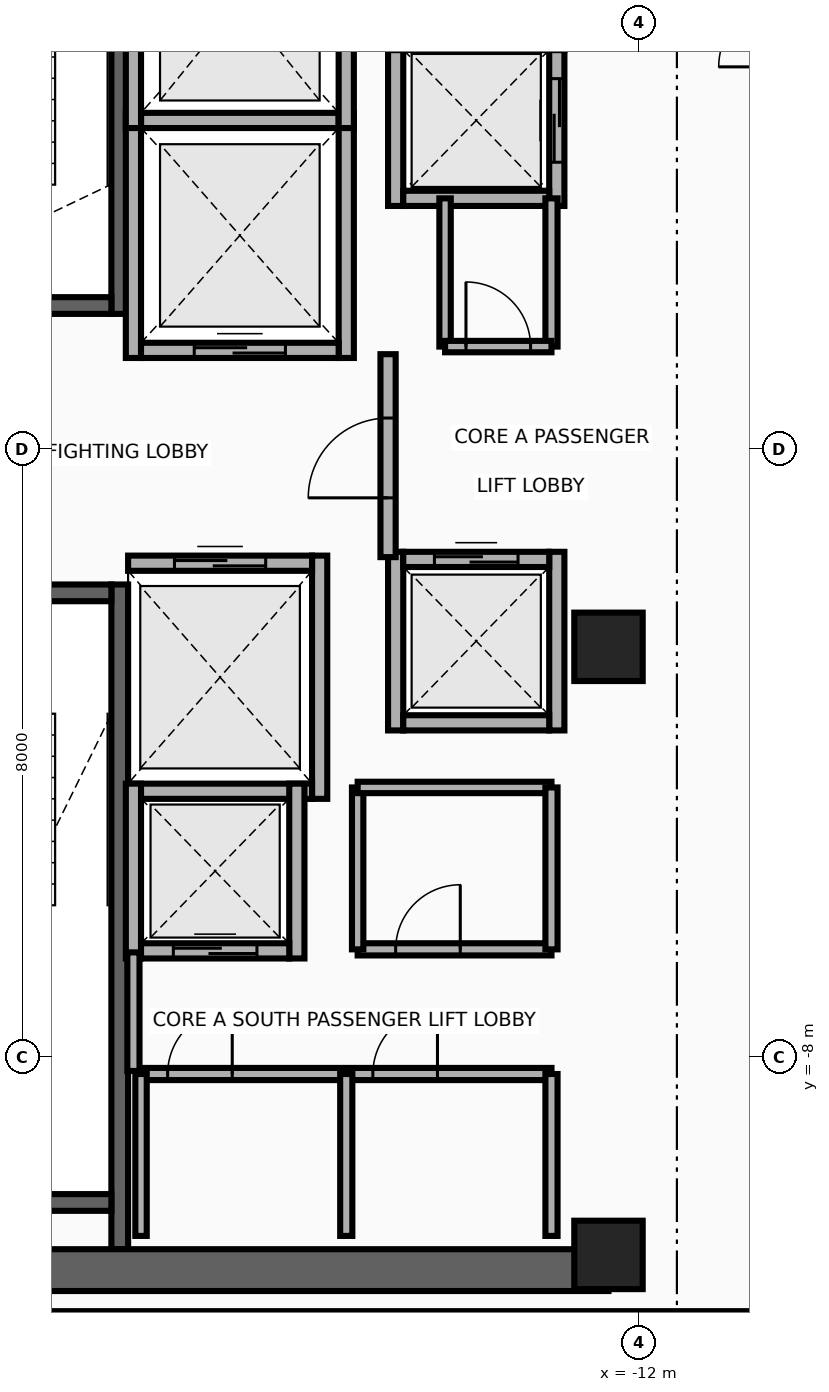
"""IFC4 building model, lengths in metres.
Left out: names, types, materials, properties, quantities, classifications, styles, units other than length and angle.
Written with IfcOpenShell. Run it as: python <this file> out.ifc"""

import sys

from ifc_helpers import new_model, si_unit, direction, frame, frame_2d, origin, origin_2d, place, context, subcontext, project, spatial, rectangle, extrude, source, transform, mapped, element, fill, save


model = new_model("IFC4")
c1 = context("Model", 3, precision=1e-05, world=origin(), true_north=direction((0.0, 1.0)))
c2 = subcontext(c1, "Body", "Model", "MODEL_VIEW")
j1 = project(units=[si_unit("LENGTHUNIT", "METRE"), si_unit("PLANEANGLEUNIT", "RADIAN")], contexts=[c1])
p1 = place(None, origin())
s1 = spatial("IfcSite", under=j1, at=p1, CompositionType="ELEMENT")
p2 = place(p1, origin())
s2 = spatial("IfcBuilding", under=s1, at=p2, CompositionType="ELEMENT")
p3 = place(p2, frame((0.0, 0.0, 223.0)))
s3 = spatial("IfcBuildingStorey", under=s2, at=p3, CompositionType="ELEMENT", Elevation=223.0)
p4 = place(p3, frame((-18.83, 1.78, 0.0), z_axis=(0.0, 0.0, 1.0), x_axis=(0.0, 1.0, 0.0)))
e1 = element("IfcWall", 1, at=p4, inside=s3, PredefinedType="SHEAR", context=c2, shape_type="SweptSolid", body=[
    extrude(rectangle(XDim=8.745, YDim=0.22, at=frame_2d((4.373, 0.0))), origin(), (0.0, 0.0, 1.0), 3.26),
])
p5 = place(p3, frame((-22.05, 1.89, 0.0), z_axis=(0.0, 0.0, 1.0), x_axis=(1.0, 0.0, 0.0)))
e2 = element("IfcWall", 2, at=p5, inside=s3, PredefinedType="SHEAR", context=c2, shape_type="SweptSolid", body=[
    extrude(rectangle(XDim=3.11, YDim=0.22, at=frame_2d((1.555, 0.0))), origin(), (0.0, 0.0, 1.0), 3.26),
])
p6 = place(p5, frame((1.0, 0.0, 0.0)))
e3 = element("IfcOpeningElement", 3, at=p6, cuts=e2, PredefinedType="OPENING", context=c2, shape_type="SweptSolid", body=[
    extrude(rectangle(XDim=1.1, YDim=2.15, at=frame_2d((0.55, 1.075))), frame((0.0, 0.125, 0.0), z_axis=(0.0, -1.0, 0.0), x_axis=(1.0, 0.0, 0.0)), (0.0, 0.0, 1.0), 0.25),
])
p7 = place(p3, frame((-18.83, -10.525, 0.0), z_axis=(0.0, 0.0, 1.0), x_axis=(0.0, 1.0, 0.0)))
e4 = element("IfcWall", 4, at=p7, inside=s3, PredefinedType="SHEAR", context=c2, shape_type="SweptSolid", body=[
    extrude(rectangle(XDim=8.745, YDim=0.22, at=frame_2d((4.373, 0.0))), origin(), (0.0, 0.0, 1.0), 3.26),
])
p8 = place(p3, frame((-22.05, -9.91, 0.0), z_axis=(0.0, 0.0, 1.0), x_axis=(1.0, 0.0, 0.0)))
e5 = element("IfcWall", 5, at=p8, inside=s3, PredefinedType="SHEAR", context=c2, shape_type="SweptSolid", body=[
    extrude(rectangle(XDim=3.11, YDim=0.22, at=frame_2d((1.555, 0.0))), origin(), (0.0, 0.0, 1.0), 3.26),
])
p9 = place(p3, frame((-22.05, -1.89, 0.0), z_axis=(0.0, 0.0, 1.0), x_axis=(1.0, 0.0, 0.0)))
e6 = element("IfcWall", 6, at=p9, inside=s3, PredefinedType="SHEAR", context=c2, shape_type="SweptSolid", body=[
    extrude(rectangle(XDim=3.11, YDim=0.22, at=frame_2d((1.555, 0.0))), origin(), (0.0, 0.0, 1.0), 3.26),
])
p10 = place(p9, frame((1.0, 0.0, 0.0)))
e7 = element("IfcOpeningElement", 7, at=p10, cuts=e6, PredefinedType="OPENING", context=c2, shape_type="SweptSolid", body=[
    extrude(rectangle(XDim=1.1, YDim=2.15, at=frame_2d((0.55, 1.075))), frame((0.0, 0.125, 0.0), z_axis=(0.0, -1.0, 0.0), x_axis=(1.0, 0.0, 0.0)), (0.0, 0.0, 1.0), 0.25),
])
p11 = place(p3, frame((-22.65, -10.8, 0.0), z_axis=(0.0, 0.0, 1.0), x_axis=(1.0, 0.0, 0.0)))
e8 = element("IfcWall", 8, at=p11, inside=s3, PredefinedType="SHEAR", context=c2, shape_type="SweptSolid", body=[
    extrude(rectangle(XDim=10.25, YDim=0.55, at=frame_2d((5.125, 0.0))), origin(), (0.0, 0.0, 1.0), 3.26),
])
m1 = source(origin(), c2, "Body", "SweptSolid", [
    extrude(rectangle(XDim=0.9, YDim=0.9, at=origin_2d()), origin(), (0.0, 0.0, 1.0), 3.5),
])
for number, where, z_axis, x_axis in (
    (9, (-12.4, -10.6, 0.0), (0.0, 0.0, 1.0), (1.0, 0.0, 0.0)),
    (10, (-12.4, -2.6, 0.0), (0.0, 0.0, 1.0), (1.0, 0.0, 0.0)),
):
    element("IfcColumn", number, at=place(p3, frame(where, z_axis=z_axis, x_axis=x_axis)), inside=s3, PredefinedType="COLUMN", context=c2, shape_type="MappedRepresentation", body=[
        mapped(m1, transform((0.0, 0.0, 0.0), x_axis=(1.0, 0.0, 0.0), y_axis=(0.0, 1.0, 0.0), z_axis=(0.0, 0.0, 1.0), scale=1.0)),
    ])
for number, where, z_axis, x_axis in (
    (11, (-18.65, 1.2, 0.0), (0.0, 0.0, 1.0), (0.0, 1.0, 0.0)),
    (12, (-15.85, 1.2, 0.0), (0.0, 0.0, 1.0), (0.0, 1.0, 0.0)),
):
    element("IfcWall", number, at=place(p3, frame(where, z_axis=z_axis, x_axis=x_axis)), inside=s3, PredefinedType="MOVABLE", context=c2, shape_type="SweptSolid", body=[
        extrude(rectangle(XDim=3.225, YDim=0.2, at=frame_2d((1.613, 0.0))), origin(), (0.0, 0.0, 1.0), 3.26),
    ])
p12 = place(p3, frame((-18.55, 1.3, 0.0), z_axis=(0.0, 0.0, 1.0), x_axis=(1.0, 0.0, 0.0)))
e13 = element("IfcWall", 13, at=p12, inside=s3, PredefinedType="MOVABLE", context=c2, shape_type="SweptSolid", body=[
    extrude(rectangle(XDim=2.6, YDim=0.2, at=frame_2d((1.3, 0.0))), origin(), (0.0, 0.0, 1.0), 3.26),
])
p13 = place(p12, frame((0.7, 0.0, 0.0)))
e14 = element("IfcOpeningElement", 14, at=p13, cuts=e13, PredefinedType="OPENING", context=c2, shape_type="SweptSolid", body=[
    extrude(rectangle(XDim=1.2, YDim=2.1, at=frame_2d((0.6, 1.05))), frame((0.0, 0.115, 0.0), z_axis=(0.0, -1.0, 0.0), x_axis=(1.0, 0.0, 0.0)), (0.0, 0.0, 1.0), 0.23),
])
p14 = place(p3, frame((-18.55, 4.325, 0.0), z_axis=(0.0, 0.0, 1.0), x_axis=(1.0, 0.0, 0.0)))
e15 = element("IfcWall", 15, at=p14, inside=s3, PredefinedType="MOVABLE", context=c2, shape_type="SweptSolid", body=[
    extrude(rectangle(XDim=2.6, YDim=0.2, at=frame_2d((1.3, 0.0))), origin(), (0.0, 0.0, 1.0), 3.26),
])
p15 = place(p3, frame((-16.2, -4.6, 0.0), z_axis=(0.0, 0.0, 1.0), x_axis=(0.0, 1.0, 0.0)))
e16 = element("IfcWall", 16, at=p15, inside=s3, PredefinedType="MOVABLE", context=c2, shape_type="SweptSolid", body=[
    extrude(rectangle(XDim=3.2, YDim=0.2, at=frame_2d((1.6, 0.0))), origin(), (0.0, 0.0, 1.0), 3.26),
])
p16 = place(p3, frame((-18.72, -4.5, 0.0), z_axis=(0.0, 0.0, 1.0), x_axis=(1.0, 0.0, 0.0)))
e17 = element("IfcWall", 17, at=p16, inside=s3, PredefinedType="MOVABLE", context=c2, shape_type="SweptSolid", body=[
    extrude(rectangle(XDim=2.42, YDim=0.2, at=frame_2d((1.21, 0.0))), origin(), (0.0, 0.0, 1.0), 3.26),
])
p17 = place(p3, frame((-18.72, -1.5, 0.0), z_axis=(0.0, 0.0, 1.0), x_axis=(1.0, 0.0, 0.0)))
e18 = element("IfcWall", 18, at=p17, inside=s3, PredefinedType="MOVABLE", context=c2, shape_type="SweptSolid", body=[
    extrude(rectangle(XDim=2.42, YDim=0.2, at=frame_2d((1.21, 0.0))), origin(), (0.0, 0.0, 1.0), 3.26),
])
p18 = place(p17, frame((0.61, 0.0, 0.0)))
e19 = element("IfcOpeningElement", 19, at=p18, cuts=e18, PredefinedType="OPENING", context=c2, shape_type="SweptSolid", body=[
    extrude(rectangle(XDim=1.2, YDim=2.1, at=frame_2d((0.6, 1.05))), frame((0.0, 0.115, 0.0), z_axis=(0.0, -1.0, 0.0), x_axis=(1.0, 0.0, 0.0)), (0.0, 0.0, 1.0), 0.23),
])
for number, where, z_axis, x_axis in (
    (20, (-18.65, 4.225, 0.0), (0.0, 0.0, 1.0), (0.0, 1.0, 0.0)),
    (21, (-15.85, 4.225, 0.0), (0.0, 0.0, 1.0), (0.0, 1.0, 0.0)),
):
    element("IfcWall", number, at=place(p3, frame(where, z_axis=z_axis, x_axis=x_axis)), inside=s3, PredefinedType="MOVABLE", context=c2, shape_type="SweptSolid", body=[
        extrude(rectangle(XDim=3.325, YDim=0.2, at=frame_2d((1.663, 0.0))), origin(), (0.0, 0.0, 1.0), 3.26),
    ])
p19 = place(p3, frame((-15.2, 3.2, 0.0), z_axis=(0.0, 0.0, 1.0), x_axis=(0.0, 1.0, 0.0)))
e22 = element("IfcWall", 22, at=p19, inside=s3, PredefinedType="MOVABLE", context=c2, shape_type="SweptSolid", body=[
    extrude(rectangle(XDim=2.25, YDim=0.2, at=frame_2d((1.125, 0.0))), origin(), (0.0, 0.0, 1.0), 3.26),
])
p20 = place(p3, frame((-13.08, 3.2, 0.0), z_axis=(0.0, 0.0, 1.0), x_axis=(0.0, 1.0, 0.0)))
e23 = element("IfcWall", 23, at=p20, inside=s3, PredefinedType="MOVABLE", context=c2, shape_type="SweptSolid", body=[
    extrude(rectangle(XDim=2.25, YDim=0.2, at=frame_2d((1.125, 0.0))), origin(), (0.0, 0.0, 1.0), 3.26),
])
p21 = place(p20, frame((0.575, 0.0, 0.0)))
e24 = element("IfcOpeningElement", 24, at=p21, cuts=e23, PredefinedType="OPENING", context=c2, shape_type="SweptSolid", body=[
    extrude(rectangle(XDim=1.1, YDim=2.1, at=frame_2d((0.55, 1.05))), frame((0.0, 0.115, 0.0), z_axis=(0.0, -1.0, 0.0), x_axis=(1.0, 0.0, 0.0)), (0.0, 0.0, 1.0), 0.23),
])
p22 = place(p3, frame((-15.1, 3.3, 0.0), z_axis=(0.0, 0.0, 1.0), x_axis=(1.0, 0.0, 0.0)))
e25 = element("IfcWall", 25, at=p22, inside=s3, PredefinedType="MOVABLE", context=c2, shape_type="SweptSolid", body=[
    extrude(rectangle(XDim=1.92, YDim=0.2, at=frame_2d((0.96, 0.0))), origin(), (0.0, 0.0, 1.0), 3.26),
])
for number, where, z_axis, x_axis in (
    (26, (-18.65, -6.7, 0.0), (0.0, 0.0, 1.0), (0.0, 1.0, 0.0)),
    (27, (-16.5, -6.7, 0.0), (0.0, 0.0, 1.0), (0.0, 1.0, 0.0)),
):
    element("IfcWall", number, at=place(p3, frame(where, z_axis=z_axis, x_axis=x_axis)), inside=s3, PredefinedType="MOVABLE", context=c2, shape_type="SweptSolid", body=[
        extrude(rectangle(XDim=2.3, YDim=0.2, at=frame_2d((1.15, 0.0))), origin(), (0.0, 0.0, 1.0), 3.26),
    ])
p23 = place(p3, frame((-18.55, -6.6, 0.0), z_axis=(0.0, 0.0, 1.0), x_axis=(1.0, 0.0, 0.0)))
e28 = element("IfcWall", 28, at=p23, inside=s3, PredefinedType="MOVABLE", context=c2, shape_type="SweptSolid", body=[
    extrude(rectangle(XDim=1.95, YDim=0.2, at=frame_2d((0.975, 0.0))), origin(), (0.0, 0.0, 1.0), 3.26),
])
p24 = place(p23, frame((0.425, 0.0, 0.0)))
e29 = element("IfcOpeningElement", 29, at=p24, cuts=e28, PredefinedType="OPENING", context=c2, shape_type="SweptSolid", body=[
    extrude(rectangle(XDim=1.1, YDim=2.1, at=frame_2d((0.55, 1.05))), frame((0.0, 0.115, 0.0), z_axis=(0.0, -1.0, 0.0), x_axis=(1.0, 0.0, 0.0)), (0.0, 0.0, 1.0), 0.23),
])
for number, where, z_axis, x_axis in (
    (30, (-15.2, -3.7, 0.0), (0.0, 0.0, 1.0), (0.0, 1.0, 0.0)),
    (31, (-13.08, -3.7, 0.0), (0.0, 0.0, 1.0), (0.0, 1.0, 0.0)),
):
    element("IfcWall", number, at=place(p3, frame(where, z_axis=z_axis, x_axis=x_axis)), inside=s3, PredefinedType="MOVABLE", context=c2, shape_type="SweptSolid", body=[
        extrude(rectangle(XDim=2.35, YDim=0.2, at=frame_2d((1.175, 0.0))), origin(), (0.0, 0.0, 1.0), 3.26),
    ])
p25 = place(p3, frame((-15.1, -3.6, 0.0), z_axis=(0.0, 0.0, 1.0), x_axis=(1.0, 0.0, 0.0)))
e32 = element("IfcWall", 32, at=p25, inside=s3, PredefinedType="MOVABLE", context=c2, shape_type="SweptSolid", body=[
    extrude(rectangle(XDim=1.92, YDim=0.2, at=frame_2d((0.96, 0.0))), origin(), (0.0, 0.0, 1.0), 3.26),
])
p26 = place(p3, frame((-15.1, -1.45, 0.0), z_axis=(0.0, 0.0, 1.0), x_axis=(1.0, 0.0, 0.0)))
e33 = element("IfcWall", 33, at=p26, inside=s3, PredefinedType="MOVABLE", context=c2, shape_type="SweptSolid", body=[
    extrude(rectangle(XDim=1.92, YDim=0.2, at=frame_2d((0.96, 0.0))), origin(), (0.0, 0.0, 1.0), 3.26),
])
p27 = place(p26, frame((0.41, 0.0, 0.0)))
e34 = element("IfcOpeningElement", 34, at=p27, cuts=e33, PredefinedType="OPENING", context=c2, shape_type="SweptSolid", body=[
    extrude(rectangle(XDim=1.1, YDim=2.1, at=frame_2d((0.55, 1.05))), frame((0.0, 0.115, 0.0), z_axis=(0.0, -1.0, 0.0), x_axis=(1.0, 0.0, 0.0)), (0.0, 0.0, 1.0), 0.23),
])
p28 = place(p3, frame((-15.3, -1.42, 0.0), z_axis=(0.0, 0.0, 1.0), x_axis=(0.0, 1.0, 0.0)))
e35 = element("IfcWall", 35, at=p28, inside=s3, PredefinedType="PARTITIONING", context=c2, shape_type="SweptSolid", body=[
    extrude(rectangle(XDim=2.67, YDim=0.2, at=frame_2d((1.335, 0.0))), origin(), (0.0, 0.0, 1.0), 3.26),
])
p29 = place(p28, frame((0.78, 0.0, 0.0)))
e36 = element("IfcOpeningElement", 36, at=p29, cuts=e35, PredefinedType="OPENING", context=c2, shape_type="SweptSolid", body=[
    extrude(rectangle(XDim=1.05, YDim=2.15, at=frame_2d((0.525, 1.075))), frame((0.0, 0.115, 0.0), z_axis=(0.0, -1.0, 0.0), x_axis=(1.0, 0.0, 0.0)), (0.0, 0.0, 1.0), 0.23),
])
p30 = place(p3, frame((-18.65, -8.18, 0.0), z_axis=(0.0, 0.0, 1.0), x_axis=(0.0, 1.0, 0.0)))
e37 = element("IfcWall", 37, at=p30, inside=s3, PredefinedType="PARTITIONING", context=c2, shape_type="SweptSolid", body=[
    extrude(rectangle(XDim=1.56, YDim=0.16, at=frame_2d((0.78, 0.0))), origin(), (0.0, 0.0, 1.0), 3.26),
])
p31 = place(p3, frame((-18.55, -8.22, 0.0), z_axis=(0.0, 0.0, 1.0), x_axis=(1.0, 0.0, 0.0)))
e38 = element("IfcWall", 38, at=p31, inside=s3, PredefinedType="PARTITIONING", context=c2, shape_type="SweptSolid", body=[
    extrude(rectangle(XDim=5.4, YDim=0.16, at=frame_2d((2.7, 0.0))), origin(), (0.0, 0.0, 1.0), 3.26),
])
p32 = place(p31, frame((0.35, 0.0, 0.0)))
e39 = element("IfcOpeningElement", 39, at=p32, cuts=e38, PredefinedType="OPENING", context=c2, shape_type="SweptSolid", body=[
    extrude(rectangle(XDim=0.85, YDim=2.05, at=frame_2d((0.425, 1.025))), frame((0.0, 0.095, 0.0), z_axis=(0.0, -1.0, 0.0), x_axis=(1.0, 0.0, 0.0)), (0.0, 0.0, 1.0), 0.19),
])
p33 = place(p31, frame((3.05, 0.0, 0.0)))
e40 = element("IfcOpeningElement", 40, at=p33, cuts=e38, PredefinedType="OPENING", context=c2, shape_type="SweptSolid", body=[
    extrude(rectangle(XDim=0.85, YDim=2.05, at=frame_2d((0.425, 1.025))), frame((0.0, 0.095, 0.0), z_axis=(0.0, -1.0, 0.0), x_axis=(1.0, 0.0, 0.0)), (0.0, 0.0, 1.0), 0.19),
])
p34 = place(p3, frame((-18.55, -10.35, 0.0), z_axis=(0.0, 0.0, 1.0), x_axis=(0.0, 1.0, 0.0)))
e41 = element("IfcWall", 41, at=p34, inside=s3, PredefinedType="PARTITIONING", context=c2, shape_type="SweptSolid", body=[
    extrude(rectangle(XDim=2.13, YDim=0.15, at=frame_2d((1.065, 0.0))), origin(), (0.0, 0.0, 1.0), 3.26),
])
for number, where, z_axis, x_axis in (
    (42, (-13.15, -10.35, 0.0), (0.0, 0.0, 1.0), (0.0, 1.0, 0.0)),
    (43, (-15.85, -10.35, 0.0), (0.0, 0.0, 1.0), (0.0, 1.0, 0.0)),
):
    element("IfcWall", number, at=place(p3, frame(where, z_axis=z_axis, x_axis=x_axis)), inside=s3, PredefinedType="PARTITIONING", context=c2, shape_type="SweptSolid", body=[
        extrude(rectangle(XDim=2.13, YDim=0.16, at=frame_2d((1.065, 0.0))), origin(), (0.0, 0.0, 1.0), 3.26),
    ])
p35 = place(p3, frame((-15.7, -6.58, 0.0), z_axis=(0.0, 0.0, 1.0), x_axis=(1.0, 0.0, 0.0)))
e44 = element("IfcWall", 44, at=p35, inside=s3, PredefinedType="PARTITIONING", context=c2, shape_type="SweptSolid", body=[
    extrude(rectangle(XDim=2.55, YDim=0.16, at=frame_2d((1.275, 0.0))), origin(), (0.0, 0.0, 1.0), 3.26),
])
p36 = place(p35, frame((0.5, 0.0, 0.0)))
e45 = element("IfcOpeningElement", 45, at=p36, cuts=e44, PredefinedType="OPENING", context=c2, shape_type="SweptSolid", body=[
    extrude(rectangle(XDim=0.85, YDim=2.05, at=frame_2d((0.425, 1.025))), frame((0.0, 0.095, 0.0), z_axis=(0.0, -1.0, 0.0), x_axis=(1.0, 0.0, 0.0)), (0.0, 0.0, 1.0), 0.19),
])
p37 = place(p3, frame((-15.7, -6.58, 0.0), z_axis=(0.0, 0.0, 1.0), x_axis=(0.0, 1.0, 0.0)))
e46 = element("IfcWall", 46, at=p37, inside=s3, PredefinedType="PARTITIONING", context=c2, shape_type="SweptSolid", body=[
    extrude(rectangle(XDim=2.13, YDim=0.15, at=frame_2d((1.065, 0.0))), origin(), (0.0, 0.0, 1.0), 3.26),
])
p38 = place(p3, frame((-15.7, -4.45, 0.0), z_axis=(0.0, 0.0, 1.0), x_axis=(1.0, 0.0, 0.0)))
e47 = element("IfcWall", 47, at=p38, inside=s3, PredefinedType="PARTITIONING", context=c2, shape_type="SweptSolid", body=[
    extrude(rectangle(XDim=2.55, YDim=0.15, at=frame_2d((1.275, 0.0))), origin(), (0.0, 0.0, 1.0), 3.26),
])
p39 = place(p3, frame((-13.15, -6.58, 0.0), z_axis=(0.0, 0.0, 1.0), x_axis=(0.0, 1.0, 0.0)))
e48 = element("IfcWall", 48, at=p39, inside=s3, PredefinedType="PARTITIONING", context=c2, shape_type="SweptSolid", body=[
    extrude(rectangle(XDim=2.13, YDim=0.16, at=frame_2d((1.065, 0.0))), origin(), (0.0, 0.0, 1.0), 3.26),
])
p40 = place(p3, frame((-13.15, 1.35, 0.0), z_axis=(0.0, 0.0, 1.0), x_axis=(0.0, 1.0, 0.0)))
e49 = element("IfcWall", 49, at=p40, inside=s3, PredefinedType="PARTITIONING", context=c2, shape_type="SweptSolid", body=[
    extrude(rectangle(XDim=1.95, YDim=0.16, at=frame_2d((0.975, 0.0))), origin(), (0.0, 0.0, 1.0), 3.26),
])
p41 = place(p3, frame((-14.55, 1.35, 0.0), z_axis=(0.0, 0.0, 1.0), x_axis=(0.0, 1.0, 0.0)))
e50 = element("IfcWall", 50, at=p41, inside=s3, PredefinedType="PARTITIONING", context=c2, shape_type="SweptSolid", body=[
    extrude(rectangle(XDim=1.95, YDim=0.15, at=frame_2d((0.975, 0.0))), origin(), (0.0, 0.0, 1.0), 3.26),
])
p42 = place(p3, frame((-14.55, 1.35, 0.0), z_axis=(0.0, 0.0, 1.0), x_axis=(1.0, 0.0, 0.0)))
e51 = element("IfcWall", 51, at=p42, inside=s3, PredefinedType="PARTITIONING", context=c2, shape_type="SweptSolid", body=[
    extrude(rectangle(XDim=1.4, YDim=0.15, at=frame_2d((0.7, 0.0))), origin(), (0.0, 0.0, 1.0), 3.26),
])
p43 = place(p42, frame((0.275, 0.0, 0.0)))
e52 = element("IfcOpeningElement", 52, at=p43, cuts=e51, PredefinedType="OPENING", context=c2, shape_type="SweptSolid", body=[
    extrude(rectangle(XDim=0.85, YDim=2.05, at=frame_2d((0.425, 1.025))), frame((0.0, 0.09, 0.0), z_axis=(0.0, -1.0, 0.0), x_axis=(1.0, 0.0, 0.0)), (0.0, 0.0, 1.0), 0.18),
])
p44 = place(p3, frame((-23.45, -11.42, 0.0), z_axis=(0.0, 0.0, 1.0), x_axis=(1.0, 0.0, 0.0)))
e53 = element("IfcWall", 53, at=p44, inside=s3, PredefinedType="PARTITIONING", context=c2, shape_type="SweptSolid", body=[
    extrude(rectangle(XDim=13.84, YDim=0.16, at=frame_2d((6.92, 0.0))), origin(), (0.0, 0.0, 1.0), 2.634),
])
p45 = place(p13, origin())
e54 = element("IfcDoor", 54, at=p45, inside=s3, OperationType="DOUBLE_DOOR_SLIDING", PredefinedType="DOOR", context=c2, shape_type="SweptSolid", body=[
    extrude(rectangle(XDim=1.2, YDim=2.1, at=frame_2d((0.6, 1.05))), frame((0.0, 0.025, 0.0), z_axis=(0.0, -1.0, 0.0), x_axis=(1.0, 0.0, 0.0)), (0.0, 0.0, 1.0), 0.05),
])
fill(e14, e54)
p46 = place(p18, origin())
e55 = element("IfcDoor", 55, at=p46, inside=s3, OperationType="DOUBLE_DOOR_SLIDING", PredefinedType="DOOR", context=c2, shape_type="SweptSolid", body=[
    extrude(rectangle(XDim=1.2, YDim=2.1, at=frame_2d((0.6, 1.05))), frame((0.0, 0.025, 0.0), z_axis=(0.0, -1.0, 0.0), x_axis=(1.0, 0.0, 0.0)), (0.0, 0.0, 1.0), 0.05),
])
fill(e19, e55)
p47 = place(p21, origin())
e56 = element("IfcDoor", 56, at=p47, inside=s3, OperationType="DOUBLE_DOOR_SLIDING", PredefinedType="DOOR", context=c2, shape_type="SweptSolid", body=[
    extrude(rectangle(XDim=1.1, YDim=2.1, at=frame_2d((0.55, 1.05))), frame((0.0, 0.025, 0.0), z_axis=(0.0, -1.0, 0.0), x_axis=(1.0, 0.0, 0.0)), (0.0, 0.0, 1.0), 0.05),
])
fill(e24, e56)
p48 = place(p24, origin())
e57 = element("IfcDoor", 57, at=p48, inside=s3, OperationType="DOUBLE_DOOR_SLIDING", PredefinedType="DOOR", context=c2, shape_type="SweptSolid", body=[
    extrude(rectangle(XDim=1.1, YDim=2.1, at=frame_2d((0.55, 1.05))), frame((0.0, 0.025, 0.0), z_axis=(0.0, -1.0, 0.0), x_axis=(1.0, 0.0, 0.0)), (0.0, 0.0, 1.0), 0.05),
])
fill(e29, e57)
p49 = place(p27, origin())
e58 = element("IfcDoor", 58, at=p49, inside=s3, OperationType="DOUBLE_DOOR_SLIDING", PredefinedType="DOOR", context=c2, shape_type="SweptSolid", body=[
    extrude(rectangle(XDim=1.1, YDim=2.1, at=frame_2d((0.55, 1.05))), frame((0.0, 0.025, 0.0), z_axis=(0.0, -1.0, 0.0), x_axis=(1.0, 0.0, 0.0)), (0.0, 0.0, 1.0), 0.05),
])
fill(e34, e58)
p50 = place(p29, origin())
e59 = element("IfcDoor", 59, at=p50, inside=s3, OperationType="SINGLE_SWING_RIGHT", PredefinedType="DOOR", context=c2, shape_type="SweptSolid", body=[
    extrude(rectangle(XDim=1.05, YDim=2.15, at=frame_2d((0.525, 1.075))), frame((0.0, 0.025, 0.0), z_axis=(0.0, -1.0, 0.0), x_axis=(1.0, 0.0, 0.0)), (0.0, 0.0, 1.0), 0.05),
])
fill(e36, e59)
p51 = place(p32, origin())
e60 = element("IfcDoor", 60, at=p51, inside=s3, OperationType="SINGLE_SWING_RIGHT", PredefinedType="DOOR", context=c2, shape_type="SweptSolid", body=[
    extrude(rectangle(XDim=0.85, YDim=2.05, at=frame_2d((0.425, 1.025))), frame((0.0, 0.025, 0.0), z_axis=(0.0, -1.0, 0.0), x_axis=(1.0, 0.0, 0.0)), (0.0, 0.0, 1.0), 0.05),
])
fill(e39, e60)
p52 = place(p33, origin())
e61 = element("IfcDoor", 61, at=p52, inside=s3, OperationType="SINGLE_SWING_LEFT", PredefinedType="DOOR", context=c2, shape_type="SweptSolid", body=[
    extrude(rectangle(XDim=0.85, YDim=2.05, at=frame_2d((0.425, 1.025))), frame((0.0, 0.025, 0.0), z_axis=(0.0, -1.0, 0.0), x_axis=(1.0, 0.0, 0.0)), (0.0, 0.0, 1.0), 0.05),
])
fill(e40, e61)
p53 = place(p36, origin())
e62 = element("IfcDoor", 62, at=p53, inside=s3, OperationType="SINGLE_SWING_RIGHT", PredefinedType="DOOR", context=c2, shape_type="SweptSolid", body=[
    extrude(rectangle(XDim=0.85, YDim=2.05, at=frame_2d((0.425, 1.025))), frame((0.0, 0.025, 0.0), z_axis=(0.0, -1.0, 0.0), x_axis=(1.0, 0.0, 0.0)), (0.0, 0.0, 1.0), 0.05),
])
fill(e45, e62)
p54 = place(p43, origin())
e63 = element("IfcDoor", 63, at=p54, inside=s3, OperationType="SINGLE_SWING_LEFT", PredefinedType="DOOR", context=c2, shape_type="SweptSolid", body=[
    extrude(rectangle(XDim=0.85, YDim=2.05, at=frame_2d((0.425, 1.025))), frame((0.0, 0.025, 0.0), z_axis=(0.0, -1.0, 0.0), x_axis=(1.0, 0.0, 0.0)), (0.0, 0.0, 1.0), 0.05),
])
fill(e52, e63)
save(model, sys.argv[1])
